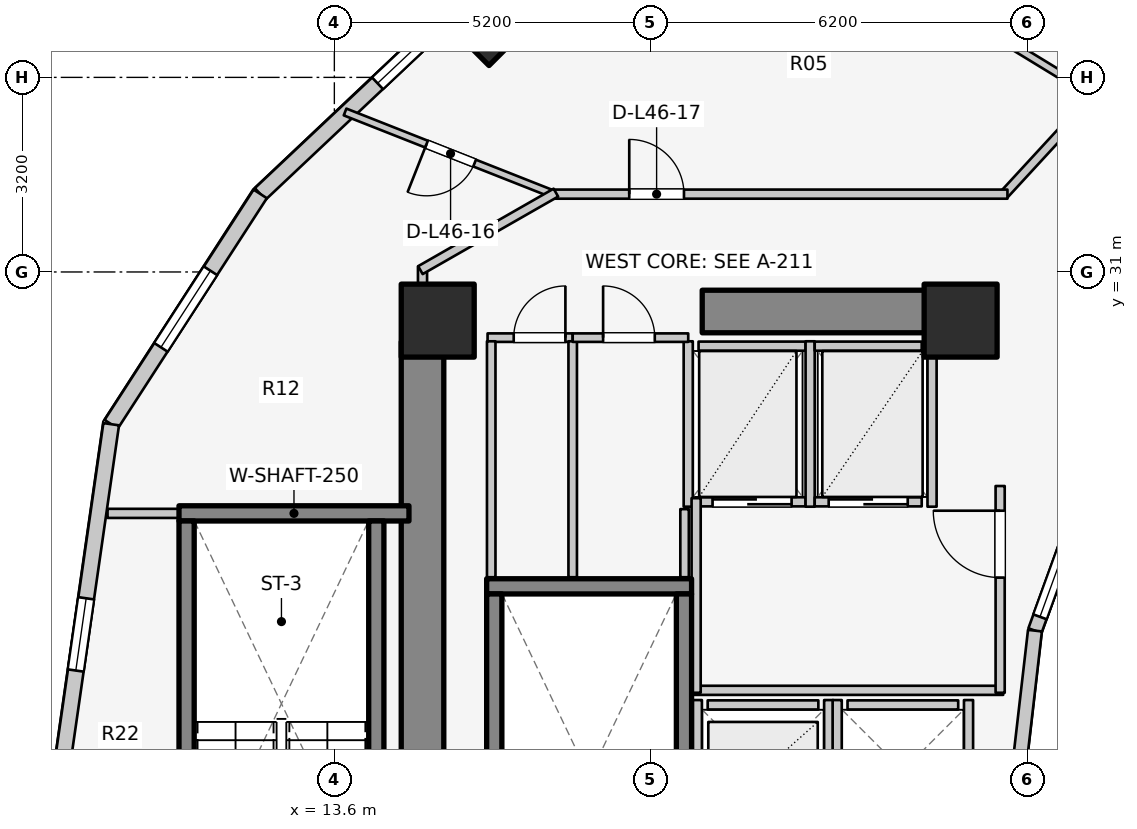
"""IFC4 building model, lengths in metres.
Left out: names, types, materials, properties, quantities, classifications, styles, units other than length and angle.
Written with IfcOpenShell. Run it as: python <this file> out.ifc"""

import sys

from ifc_helpers import new_model, si_unit, direction, frame, frame_2d, origin, origin_2d, place, context, subcontext, project, spatial, rectangle, extrude, element, fill, save


model = new_model("IFC4")
c1 = context("Model", 3, precision=1e-05, world=origin(), true_north=direction((0.0, 1.0)))
c2 = subcontext(c1, "Body", "Model", "MODEL_VIEW")
j1 = project(units=[si_unit("LENGTHUNIT", "METRE"), si_unit("PLANEANGLEUNIT", "RADIAN")], contexts=[c1])
p1 = place(None, origin())
s1 = spatial("IfcSite", under=j1, at=p1, CompositionType="ELEMENT")
p2 = place(p1, origin())
s2 = spatial("IfcBuilding", under=s1, at=p2, CompositionType="ELEMENT")
p3 = place(p2, frame((0.0, 0.0, 152.9)))
s3 = spatial("IfcBuildingStorey", under=s2, at=p3, CompositionType="ELEMENT", Elevation=152.9)
p4 = place(p3, frame((15.05, 17.05, 0.0), z_axis=(0.0, 0.0, 1.0), x_axis=(0.0, 1.0, 0.0)))
e1 = element("IfcWall", 1, at=p4, inside=s3, PredefinedType="SHEAR", context=c2, shape_type="SweptSolid", body=[
    extrude(rectangle(XDim=12.8, YDim=0.7, at=frame_2d((6.4, 0.0))), origin(), (0.0, 0.0, 1.0), 3.1),
])
p5 = place(p3, frame((19.65, 30.35, 0.0), z_axis=(0.0, 0.0, 1.0), x_axis=(1.0, 0.0, 0.0)))
e2 = element("IfcWall", 2, at=p5, inside=s3, PredefinedType="SHEAR", context=c2, shape_type="SweptSolid", body=[
    extrude(rectangle(XDim=4.5, YDim=0.7, at=frame_2d((2.25, 0.0))), origin(), (0.0, 0.0, 1.0), 3.1),
])
p6 = place(p3, frame((16.105, 25.83, 0.0), z_axis=(0.0, 0.0, 1.0), x_axis=(1.0, 0.0, 0.0)))
e3 = element("IfcWall", 3, at=p6, inside=s3, PredefinedType="SOLIDWALL", context=c2, shape_type="SweptSolid", body=[
    extrude(rectangle(XDim=3.37, YDim=0.25, at=frame_2d((1.685, 0.0))), origin(), (0.0, 0.0, 1.0), 3.1),
])
for number, where, z_axis, x_axis in (
    (4, (16.23, 17.895, 0.0), (0.0, 0.0, 1.0), (0.0, 1.0, 0.0)),
    (5, (19.35, 17.895, 0.0), (0.0, 0.0, 1.0), (0.0, 1.0, 0.0)),
):
    element("IfcWall", number, at=place(p3, frame(where, z_axis=z_axis, x_axis=x_axis)), inside=s3, PredefinedType="SOLIDWALL", context=c2, shape_type="SweptSolid", body=[
        extrude(rectangle(XDim=7.81, YDim=0.25, at=frame_2d((3.905, 0.0))), origin(), (0.0, 0.0, 1.0), 3.1),
    ])
p7 = place(p3, frame((11.045, 27.03, 0.0), z_axis=(0.0, 0.0, 1.0), x_axis=(1.0, 0.0, 0.0)))
e6 = element("IfcWall", 6, at=p7, inside=s3, PredefinedType="SOLIDWALL", context=c2, shape_type="SweptSolid", body=[
    extrude(rectangle(XDim=3.782, YDim=0.25, at=frame_2d((1.891, 0.0))), origin(), (0.0, 0.0, 1.0), 3.1),
])
for number, where, z_axis, x_axis in (
    (7, (11.17, 19.095, 0.0), (0.0, 0.0, 1.0), (0.0, 1.0, 0.0)),
    (8, (14.29, 19.095, 0.0), (0.0, 0.0, 1.0), (0.0, 1.0, 0.0)),
):
    element("IfcWall", number, at=place(p3, frame(where, z_axis=z_axis, x_axis=x_axis)), inside=s3, PredefinedType="SOLIDWALL", context=c2, shape_type="SweptSolid", body=[
        extrude(rectangle(XDim=7.81, YDim=0.25, at=frame_2d((3.905, 0.0))), origin(), (0.0, 0.0, 1.0), 3.1),
    ])
for number, where, z_axis, x_axis in (
    (9, (23.9, 30.2, 0.0), (0.0, 0.0, 1.0), (1.0, 0.0, 0.0)),
    (10, (15.3, 30.2, 0.0), (0.0, 0.0, 1.0), (1.0, 0.0, 0.0)),
):
    element("IfcColumn", number, at=place(p3, frame(where, z_axis=z_axis, x_axis=x_axis)), inside=s3, PredefinedType="COLUMN", context=c2, shape_type="SweptSolid", body=[
        extrude(rectangle(XDim=1.2, YDim=1.2, at=origin_2d()), origin(), (0.0, 0.0, 1.0), 3.1),
    ])
p8 = place(p3, frame((16.143, 35.031, 0.0), z_axis=(0.0, 0.0, 1.0), x_axis=(-0.707106781187, 0.707106781187, 0.0)))
e11 = element("IfcColumn", 11, at=p8, inside=s3, PredefinedType="COLUMN", context=c2, shape_type="SweptSolid", body=[
    extrude(rectangle(XDim=0.9, YDim=0.9, at=origin_2d()), origin(), (0.0, 0.0, 1.0), 3.1),
])
p9 = place(p3, frame((25.834, 27.06, 0.0), z_axis=(0.0, 0.0, 1.0), x_axis=(-0.341423187295, -0.93990968033, 0.0)))
e12 = element("IfcWall", 12, at=p9, inside=s3, PredefinedType="STANDARD", context=c2, shape_type="SweptSolid", body=[
    extrude(rectangle(XDim=2.084, YDim=0.23, at=frame_2d((1.042, 0.0))), origin(), (0.0, 0.0, 1.0), 2.84),
])
p10 = place(p9, frame((0.242, 0.0, 0.85)))
e13 = element("IfcOpeningElement", 13, at=p10, cuts=e12, PredefinedType="OPENING", context=c2, shape_type="SweptSolid", body=[
    extrude(rectangle(XDim=1.6, YDim=1.65, at=frame_2d((0.8, 0.825))), frame((0.0, 0.125, 0.0), z_axis=(0.0, -1.0, 0.0), x_axis=(1.0, 0.0, 0.0)), (0.0, 0.0, 1.0), 0.25),
])
p11 = place(p3, frame((25.123, 25.102, 0.0), z_axis=(0.0, 0.0, 1.0), x_axis=(-0.114711713601, -0.993398823617, 0.0)))
e14 = element("IfcWall", 14, at=p11, inside=s3, PredefinedType="STANDARD", context=c2, shape_type="SweptSolid", body=[
    extrude(rectangle(XDim=2.115, YDim=0.23, at=frame_2d((1.058, 0.0))), origin(), (0.0, 0.0, 1.0), 2.84),
])
p12 = place(p3, frame((15.731, 35.441, 0.0), z_axis=(0.0, 0.0, 1.0), x_axis=(-0.727667301037, -0.68593024354, 0.0)))
e15 = element("IfcWall", 15, at=p12, inside=s3, PredefinedType="STANDARD", context=c2, shape_type="SweptSolid", body=[
    extrude(rectangle(XDim=4.604, YDim=0.26, at=frame_2d((2.302, 0.0))), origin(), (0.0, 0.0, 1.0), 2.85),
])
p13 = place(p12, frame((0.751, 0.0, 0.75)))
e16 = element("IfcOpeningElement", 16, at=p13, cuts=e15, PredefinedType="OPENING", context=c2, shape_type="SweptSolid", body=[
    extrude(rectangle(XDim=1.2, YDim=1.5, at=frame_2d((0.6, 0.75))), frame((0.0, 0.14, 0.0), z_axis=(0.0, -1.0, 0.0), x_axis=(1.0, 0.0, 0.0)), (0.0, 0.0, 1.0), 0.28),
])
p14 = place(p3, frame((12.381, 32.284, 0.0), z_axis=(0.0, 0.0, 1.0), x_axis=(-0.543358984534, -0.839500454989, 0.0)))
e17 = element("IfcWall", 17, at=p14, inside=s3, PredefinedType="STANDARD", context=c2, shape_type="SweptSolid", body=[
    extrude(rectangle(XDim=4.511, YDim=0.26, at=frame_2d((2.256, 0.0))), origin(), (0.0, 0.0, 1.0), 2.85),
])
p15 = place(p14, frame((1.506, 0.0, 0.75)))
e18 = element("IfcOpeningElement", 18, at=p15, cuts=e17, PredefinedType="OPENING", context=c2, shape_type="SweptSolid", body=[
    extrude(rectangle(XDim=1.5, YDim=1.6, at=frame_2d((0.75, 0.8))), frame((0.0, 0.14, 0.0), z_axis=(0.0, -1.0, 0.0), x_axis=(1.0, 0.0, 0.0)), (0.0, 0.0, 1.0), 0.28),
])
p16 = place(p3, frame((9.93, 28.497, 0.0), z_axis=(0.0, 0.0, 1.0), x_axis=(-0.142227632286, -0.989833976288, 0.0)))
e19 = element("IfcWall", 19, at=p16, inside=s3, PredefinedType="STANDARD", context=c2, shape_type="SweptSolid", body=[
    extrude(rectangle(XDim=5.553, YDim=0.26, at=frame_2d((2.776, 0.0))), origin(), (0.0, 0.0, 1.0), 2.85),
])
p17 = place(p16, frame((2.892, 0.0, 0.75)))
e20 = element("IfcOpeningElement", 20, at=p17, cuts=e19, PredefinedType="OPENING", context=c2, shape_type="SweptSolid", body=[
    extrude(rectangle(XDim=1.2, YDim=1.5, at=frame_2d((0.6, 0.75))), frame((0.0, 0.14, 0.0), z_axis=(0.0, -1.0, 0.0), x_axis=(1.0, 0.0, 0.0)), (0.0, 0.0, 1.0), 0.28),
])
p18 = place(p3, frame((19.74, 23.88, 0.0), z_axis=(0.0, 0.0, 1.0), x_axis=(1.0, 0.0, 0.0)))
e21 = element("IfcWall", 21, at=p18, inside=s3, PredefinedType="SOLIDWALL", context=c2, shape_type="SweptSolid", body=[
    extrude(rectangle(XDim=1.82, YDim=0.15, at=frame_2d((0.91, 0.0))), origin(), (0.0, 0.0, 1.0), 2.855),
])
for number, where, z_axis, x_axis in (
    (22, (19.57, 21.64, 0.0), (0.0, 0.0, 1.0), (0.0, 1.0, 0.0)),
    (23, (21.73, 21.64, 0.0), (0.0, 0.0, 1.0), (0.0, 1.0, 0.0)),
):
    element("IfcWall", number, at=place(p3, frame(where, z_axis=z_axis, x_axis=x_axis)), inside=s3, PredefinedType="SOLIDWALL", context=c2, shape_type="SweptSolid", body=[
        extrude(rectangle(XDim=2.32, YDim=0.15, at=frame_2d((1.16, 0.0))), origin(), (0.0, 0.0, 1.0), 2.855),
    ])
p19 = place(p3, frame((22.04, 23.88, 0.0), z_axis=(0.0, 0.0, 1.0), x_axis=(1.0, 0.0, 0.0)))
e24 = element("IfcWall", 24, at=p19, inside=s3, PredefinedType="SOLIDWALL", context=c2, shape_type="SweptSolid", body=[
    extrude(rectangle(XDim=1.82, YDim=0.15, at=frame_2d((0.91, 0.0))), origin(), (0.0, 0.0, 1.0), 2.12),
])
p20 = place(p3, frame((21.87, 21.64, 0.0), z_axis=(0.0, 0.0, 1.0), x_axis=(0.0, 1.0, 0.0)))
e25 = element("IfcWall", 25, at=p20, inside=s3, PredefinedType="SOLIDWALL", context=c2, shape_type="SweptSolid", body=[
    extrude(rectangle(XDim=2.32, YDim=0.15, at=frame_2d((1.16, 0.0))), origin(), (0.0, 0.0, 1.0), 2.855),
])
p21 = place(p3, frame((24.03, 21.64, 0.0), z_axis=(0.0, 0.0, 1.0), x_axis=(0.0, 1.0, 0.0)))
e26 = element("IfcWall", 26, at=p21, inside=s3, PredefinedType="SOLIDWALL", context=c2, shape_type="SweptSolid", body=[
    extrude(rectangle(XDim=2.32, YDim=0.15, at=frame_2d((1.16, 0.0))), origin(), (0.0, 0.0, 1.0), 2.12),
])
p22 = place(p3, frame((19.59, 27.22, 0.0), z_axis=(0.0, 0.0, 1.0), x_axis=(1.0, 0.0, 0.0)))
e27 = element("IfcWall", 27, at=p22, inside=s3, PredefinedType="SOLIDWALL", context=c2, shape_type="SweptSolid", body=[
    extrude(rectangle(XDim=1.76, YDim=0.15, at=frame_2d((0.88, 0.0))), origin(), (0.0, 0.0, 1.0), 2.855),
])
p23 = place(p22, frame((0.23, 0.0, 0.0)))
e28 = element("IfcOpeningElement", 28, at=p23, cuts=e27, PredefinedType="OPENING", context=c2, shape_type="SweptSolid", body=[
    extrude(rectangle(XDim=1.3, YDim=2.1, at=frame_2d((0.65, 1.05))), frame((0.0, 0.085, 0.0), z_axis=(0.0, -1.0, 0.0), x_axis=(1.0, 0.0, 0.0)), (0.0, 0.0, 1.0), 0.17),
])
p24 = place(p3, frame((19.59, 29.78, 0.0), z_axis=(0.0, 0.0, 1.0), x_axis=(1.0, 0.0, 0.0)))
e29 = element("IfcWall", 29, at=p24, inside=s3, PredefinedType="SOLIDWALL", context=c2, shape_type="SweptSolid", body=[
    extrude(rectangle(XDim=1.76, YDim=0.15, at=frame_2d((0.88, 0.0))), origin(), (0.0, 0.0, 1.0), 2.855),
])
for number, where, z_axis, x_axis in (
    (30, (19.42, 27.14, 0.0), (0.0, 0.0, 1.0), (0.0, 1.0, 0.0)),
    (31, (21.425, 27.14, 0.0), (0.0, 0.0, 1.0), (0.0, 1.0, 0.0)),
):
    element("IfcWall", number, at=place(p3, frame(where, z_axis=z_axis, x_axis=x_axis)), inside=s3, PredefinedType="SOLIDWALL", context=c2, shape_type="SweptSolid", body=[
        extrude(rectangle(XDim=2.72, YDim=0.15, at=frame_2d((1.36, 0.0))), origin(), (0.0, 0.0, 1.0), 2.855),
    ])
p25 = place(p3, frame((21.5, 27.22, 0.0), z_axis=(0.0, 0.0, 1.0), x_axis=(1.0, 0.0, 0.0)))
e32 = element("IfcWall", 32, at=p25, inside=s3, PredefinedType="SOLIDWALL", context=c2, shape_type="SweptSolid", body=[
    extrude(rectangle(XDim=1.76, YDim=0.15, at=frame_2d((0.88, 0.0))), origin(), (0.0, 0.0, 1.0), 2.855),
])
p26 = place(p25, frame((0.23, 0.0, 0.0)))
e33 = element("IfcOpeningElement", 33, at=p26, cuts=e32, PredefinedType="OPENING", context=c2, shape_type="SweptSolid", body=[
    extrude(rectangle(XDim=1.3, YDim=2.1, at=frame_2d((0.65, 1.05))), frame((0.0, 0.085, 0.0), z_axis=(0.0, -1.0, 0.0), x_axis=(1.0, 0.0, 0.0)), (0.0, 0.0, 1.0), 0.17),
])
p27 = place(p3, frame((21.5, 29.78, 0.0), z_axis=(0.0, 0.0, 1.0), x_axis=(1.0, 0.0, 0.0)))
e34 = element("IfcWall", 34, at=p27, inside=s3, PredefinedType="SOLIDWALL", context=c2, shape_type="SweptSolid", body=[
    extrude(rectangle(XDim=1.76, YDim=0.15, at=frame_2d((0.88, 0.0))), origin(), (0.0, 0.0, 1.0), 2.855),
])
p28 = place(p3, frame((23.43, 27.14, 0.0), z_axis=(0.0, 0.0, 1.0), x_axis=(0.0, 1.0, 0.0)))
e35 = element("IfcWall", 35, at=p28, inside=s3, PredefinedType="SOLIDWALL", context=c2, shape_type="SweptSolid", body=[
    extrude(rectangle(XDim=2.72, YDim=0.15, at=frame_2d((1.36, 0.0))), origin(), (0.0, 0.0, 1.0), 2.855),
])
p29 = place(p3, frame((19.52, 24.12, 0.0), z_axis=(0.0, 0.0, 1.0), x_axis=(1.0, 0.0, 0.0)))
e36 = element("IfcWall", 36, at=p29, inside=s3, PredefinedType="PARTITIONING", context=c2, shape_type="SweptSolid", body=[
    extrude(rectangle(XDim=5.08, YDim=0.15, at=frame_2d((2.54, 0.0))), origin(), (0.0, 0.0, 1.0), 2.12),
])
p30 = place(p3, frame((19.55, 24.08, 0.0), z_axis=(0.0, 0.0, 1.0), x_axis=(0.0, 1.0, 0.0)))
e37 = element("IfcWall", 37, at=p30, inside=s3, PredefinedType="PARTITIONING", context=c2, shape_type="SweptSolid", body=[
    extrude(rectangle(XDim=3.2, YDim=0.15, at=frame_2d((1.6, 0.0))), origin(), (0.0, 0.0, 1.0), 2.855),
])
p31 = place(p3, frame((24.55, 24.08, 0.0), z_axis=(0.0, 0.0, 1.0), x_axis=(0.0, 1.0, 0.0)))
e38 = element("IfcWall", 38, at=p31, inside=s3, PredefinedType="PARTITIONING", context=c2, shape_type="SweptSolid", body=[
    extrude(rectangle(XDim=3.4, YDim=0.15, at=frame_2d((1.7, 0.0))), origin(), (0.0, 0.0, 1.0), 2.855),
])
p32 = place(p31, frame((1.894, 0.0, 0.0)))
e39 = element("IfcOpeningElement", 39, at=p32, cuts=e38, PredefinedType="OPENING", context=c2, shape_type="SweptSolid", body=[
    extrude(rectangle(XDim=1.1, YDim=2.1, at=frame_2d((0.55, 1.05))), frame((0.0, 0.085, 0.0), z_axis=(0.0, -1.0, 0.0), x_axis=(1.0, 0.0, 0.0)), (0.0, 0.0, 1.0), 0.17),
])
p33 = place(p3, frame((16.12, 29.92, 0.0), z_axis=(0.0, 0.0, 1.0), x_axis=(1.0, 0.0, 0.0)))
e40 = element("IfcWall", 40, at=p33, inside=s3, PredefinedType="PLUMBINGWALL", context=c2, shape_type="SweptSolid", body=[
    extrude(rectangle(XDim=1.4, YDim=0.14, at=frame_2d((0.7, 0.0))), origin(), (0.0, 0.0, 1.0), 2.855),
])
p34 = place(p33, frame((0.43, 0.0, 0.0)))
e41 = element("IfcOpeningElement", 41, at=p34, cuts=e40, PredefinedType="OPENING", context=c2, shape_type="SweptSolid", body=[
    extrude(rectangle(XDim=0.85, YDim=2.05, at=frame_2d((0.425, 1.025))), frame((0.0, 0.08, 0.0), z_axis=(0.0, -1.0, 0.0), x_axis=(1.0, 0.0, 0.0)), (0.0, 0.0, 1.0), 0.16),
])
for number, where, z_axis, x_axis in (
    (42, (16.18, 25.98, 0.0), (0.0, 0.0, 1.0), (0.0, 1.0, 0.0)),
    (43, (17.52, 25.98, 0.0), (0.0, 0.0, 1.0), (0.0, 1.0, 0.0)),
):
    element("IfcWall", number, at=place(p3, frame(where, z_axis=z_axis, x_axis=x_axis)), inside=s3, PredefinedType="PLUMBINGWALL", context=c2, shape_type="SweptSolid", body=[
        extrude(rectangle(XDim=3.88, YDim=0.14, at=frame_2d((1.94, 0.0))), origin(), (0.0, 0.0, 1.0), 2.855),
    ])
p35 = place(p3, frame((17.52, 29.92, 0.0), z_axis=(0.0, 0.0, 1.0), x_axis=(1.0, 0.0, 0.0)))
e44 = element("IfcWall", 44, at=p35, inside=s3, PredefinedType="PLUMBINGWALL", context=c2, shape_type="SweptSolid", body=[
    extrude(rectangle(XDim=1.9, YDim=0.14, at=frame_2d((0.95, 0.0))), origin(), (0.0, 0.0, 1.0), 2.855),
])
p36 = place(p35, frame((0.5, 0.0, 0.0)))
e45 = element("IfcOpeningElement", 45, at=p36, cuts=e44, PredefinedType="OPENING", context=c2, shape_type="SweptSolid", body=[
    extrude(rectangle(XDim=0.85, YDim=2.05, at=frame_2d((0.425, 1.025))), frame((0.0, 0.08, 0.0), z_axis=(0.0, -1.0, 0.0), x_axis=(1.0, 0.0, 0.0)), (0.0, 0.0, 1.0), 0.16),
])
p37 = place(p3, frame((19.36, 25.98, 0.0), z_axis=(0.0, 0.0, 1.0), x_axis=(0.0, 1.0, 0.0)))
e46 = element("IfcWall", 46, at=p37, inside=s3, PredefinedType="PLUMBINGWALL", context=c2, shape_type="SweptSolid", body=[
    extrude(rectangle(XDim=1.12, YDim=0.14, at=frame_2d((0.56, 0.0))), origin(), (0.0, 0.0, 1.0), 2.855),
])
p38 = place(p3, frame((9.87, 27.03, 0.0), z_axis=(0.0, 0.0, 1.0), x_axis=(1.0, 0.0, 0.0)))
e47 = element("IfcWall", 47, at=p38, inside=s3, PredefinedType="PARTITIONING", context=c2, shape_type="SweptSolid", body=[
    extrude(rectangle(XDim=1.17, YDim=0.15, at=frame_2d((0.585, 0.0))), origin(), (0.0, 0.0, 1.0), 2.855),
])
p39 = place(p3, frame((15.05, 29.8, 0.0), z_axis=(0.0, 0.0, 1.0), x_axis=(0.0, 1.0, 0.0)))
e48 = element("IfcWall", 48, at=p39, inside=s3, PredefinedType="PARTITIONING", context=c2, shape_type="SweptSolid", body=[
    extrude(rectangle(XDim=1.29, YDim=0.15, at=frame_2d((0.645, 0.0))), origin(), (0.0, 0.0, 1.0), 2.855),
])
p40 = place(p3, frame((17.247, 32.262, 0.0), z_axis=(0.0, 0.0, 1.0), x_axis=(-0.930204027108, 0.367042869367, 0.0)))
e49 = element("IfcWall", 49, at=p40, inside=s3, PredefinedType="MOVABLE", context=c2, shape_type="SweptSolid", body=[
    extrude(rectangle(XDim=3.731, YDim=0.12, at=frame_2d((1.865, 0.0))), origin(), (0.0, 0.0, 1.0), 2.22),
])
p41 = place(p40, frame((1.44, 0.0, 0.0)))
e50 = element("IfcOpeningElement", 50, at=p41, cuts=e49, PredefinedType="OPENING", context=c2, shape_type="SweptSolid", body=[
    extrude(rectangle(XDim=0.85, YDim=2.05, at=frame_2d((0.425, 1.025))), frame((0.0, 0.07, 0.0), z_axis=(0.0, -1.0, 0.0), x_axis=(1.0, 0.0, 0.0)), (0.0, 0.0, 1.0), 0.14),
])
p42 = place(p3, frame((26.072, 33.856, 0.0), z_axis=(0.0, 0.0, 1.0), x_axis=(-0.677579737957, -0.735449317567, 0.0)))
e51 = element("IfcWall", 51, at=p42, inside=s3, PredefinedType="PARTITIONING", context=c2, shape_type="SweptSolid", body=[
    extrude(rectangle(XDim=2.173, YDim=0.15, at=frame_2d((1.086, 0.0))), origin(), (0.0, 0.0, 1.0), 2.299),
])
p43 = place(p3, frame((17.15, 32.28, 0.0), z_axis=(0.0, 0.0, 1.0), x_axis=(1.0, 0.0, 0.0)))
e52 = element("IfcWall", 52, at=p43, inside=s3, PredefinedType="PARTITIONING", context=c2, shape_type="SweptSolid", body=[
    extrude(rectangle(XDim=7.52, YDim=0.15, at=frame_2d((3.76, 0.0))), origin(), (0.0, 0.0, 1.0), 2.299),
])
p44 = place(p43, frame((1.3, 0.0, 0.0)))
e53 = element("IfcOpeningElement", 53, at=p44, cuts=e52, PredefinedType="OPENING", context=c2, shape_type="SweptSolid", body=[
    extrude(rectangle(XDim=0.9, YDim=2.1, at=frame_2d((0.45, 1.05))), frame((0.0, 0.085, 0.0), z_axis=(0.0, -1.0, 0.0), x_axis=(1.0, 0.0, 0.0)), (0.0, 0.0, 1.0), 0.17),
])
p45 = place(p3, frame((17.243, 32.305, 0.0), z_axis=(0.0, 0.0, 1.0), x_axis=(-0.867991349648, -0.496579315857, 0.0)))
e54 = element("IfcWall", 54, at=p45, inside=s3, PredefinedType="PARTITIONING", context=c2, shape_type="SweptSolid", body=[
    extrude(rectangle(XDim=2.567, YDim=0.15, at=frame_2d((1.283, 0.0))), origin(), (0.0, 0.0, 1.0), 2.22),
])
p46 = place(p3, frame((26.062, 33.925, 0.0), z_axis=(0.0, 0.0, 1.0), x_axis=(-0.853440334679, 0.521190555501, 0.0)))
e55 = element("IfcWall", 55, at=p46, inside=s3, PredefinedType="PARTITIONING", context=c2, shape_type="SweptSolid", body=[
    extrude(rectangle(XDim=6.966, YDim=0.125, at=frame_2d((3.483, 0.0))), origin(), (0.0, 0.0, 1.0), 2.299),
])
p47 = place(p10, origin())
e56 = element("IfcWindow", 56, at=p47, inside=s3, PartitioningType="SINGLE_PANEL", PredefinedType="WINDOW", context=c2, shape_type="SweptSolid", body=[
    extrude(rectangle(XDim=1.6, YDim=1.65, at=frame_2d((0.8, 0.825))), frame((0.0, 0.03, 0.0), z_axis=(0.0, -1.0, 0.0), x_axis=(1.0, 0.0, 0.0)), (0.0, 0.0, 1.0), 0.06),
])
fill(e13, e56)
p48 = place(p13, origin())
e57 = element("IfcWindow", 57, at=p48, inside=s3, PartitioningType="SINGLE_PANEL", PredefinedType="WINDOW", context=c2, shape_type="SweptSolid", body=[
    extrude(rectangle(XDim=1.2, YDim=1.5, at=frame_2d((0.6, 0.75))), frame((0.0, 0.03, 0.0), z_axis=(0.0, -1.0, 0.0), x_axis=(1.0, 0.0, 0.0)), (0.0, 0.0, 1.0), 0.06),
])
fill(e16, e57)
p49 = place(p15, origin())
e58 = element("IfcWindow", 58, at=p49, inside=s3, PartitioningType="SINGLE_PANEL", PredefinedType="WINDOW", context=c2, shape_type="SweptSolid", body=[
    extrude(rectangle(XDim=1.5, YDim=1.6, at=frame_2d((0.75, 0.8))), frame((0.0, 0.03, 0.0), z_axis=(0.0, -1.0, 0.0), x_axis=(1.0, 0.0, 0.0)), (0.0, 0.0, 1.0), 0.06),
])
fill(e18, e58)
p50 = place(p17, origin())
e59 = element("IfcWindow", 59, at=p50, inside=s3, PartitioningType="SINGLE_PANEL", PredefinedType="WINDOW", context=c2, shape_type="SweptSolid", body=[
    extrude(rectangle(XDim=1.2, YDim=1.5, at=frame_2d((0.6, 0.75))), frame((0.0, 0.03, 0.0), z_axis=(0.0, -1.0, 0.0), x_axis=(1.0, 0.0, 0.0)), (0.0, 0.0, 1.0), 0.06),
])
fill(e20, e59)
p51 = place(p23, origin())
e60 = element("IfcDoor", 60, at=p51, inside=s3, OperationType="DOUBLE_DOOR_SLIDING", PredefinedType="DOOR", context=c2, shape_type="SweptSolid", body=[
    extrude(rectangle(XDim=1.3, YDim=2.1, at=frame_2d((0.65, 1.05))), frame((0.0, 0.025, 0.0), z_axis=(0.0, -1.0, 0.0), x_axis=(1.0, 0.0, 0.0)), (0.0, 0.0, 1.0), 0.05),
])
fill(e28, e60)
p52 = place(p26, origin())
e61 = element("IfcDoor", 61, at=p52, inside=s3, OperationType="DOUBLE_DOOR_SLIDING", PredefinedType="DOOR", context=c2, shape_type="SweptSolid", body=[
    extrude(rectangle(XDim=1.3, YDim=2.1, at=frame_2d((0.65, 1.05))), frame((0.0, 0.025, 0.0), z_axis=(0.0, -1.0, 0.0), x_axis=(1.0, 0.0, 0.0)), (0.0, 0.0, 1.0), 0.05),
])
fill(e33, e61)
p53 = place(p32, origin())
e62 = element("IfcDoor", 62, at=p53, inside=s3, OperationType="SINGLE_SWING_RIGHT", PredefinedType="DOOR", context=c2, shape_type="SweptSolid", body=[
    extrude(rectangle(XDim=1.1, YDim=2.1, at=frame_2d((0.55, 1.05))), frame((0.0, 0.025, 0.0), z_axis=(0.0, -1.0, 0.0), x_axis=(1.0, 0.0, 0.0)), (0.0, 0.0, 1.0), 0.05),
])
fill(e39, e62)
p54 = place(p34, origin())
e63 = element("IfcDoor", 63, at=p54, inside=s3, OperationType="SINGLE_SWING_RIGHT", PredefinedType="DOOR", context=c2, shape_type="SweptSolid", body=[
    extrude(rectangle(XDim=0.85, YDim=2.05, at=frame_2d((0.425, 1.025))), frame((0.0, 0.025, 0.0), z_axis=(0.0, -1.0, 0.0), x_axis=(1.0, 0.0, 0.0)), (0.0, 0.0, 1.0), 0.05),
])
fill(e41, e63)
p55 = place(p36, origin())
e64 = element("IfcDoor", 64, at=p55, inside=s3, OperationType="SINGLE_SWING_LEFT", PredefinedType="DOOR", context=c2, shape_type="SweptSolid", body=[
    extrude(rectangle(XDim=0.85, YDim=2.05, at=frame_2d((0.425, 1.025))), frame((0.0, 0.025, 0.0), z_axis=(0.0, -1.0, 0.0), x_axis=(1.0, 0.0, 0.0)), (0.0, 0.0, 1.0), 0.05),
])
fill(e45, e64)
p56 = place(p41, origin())
e65 = element("IfcDoor", 65, at=p56, inside=s3, OperationType="SINGLE_SWING_RIGHT", PredefinedType="DOOR", context=c2, shape_type="SweptSolid", body=[
    extrude(rectangle(XDim=0.85, YDim=2.05, at=frame_2d((0.425, 1.025))), frame((0.0, 0.025, 0.0), z_axis=(0.0, -1.0, 0.0), x_axis=(1.0, 0.0, 0.0)), (0.0, 0.0, 1.0), 0.05),
])
fill(e50, e65)
p57 = place(p44, origin())
e66 = element("IfcDoor", 66, at=p57, inside=s3, OperationType="SINGLE_SWING_LEFT", PredefinedType="DOOR", context=c2, shape_type="SweptSolid", body=[
    extrude(rectangle(XDim=0.9, YDim=2.1, at=frame_2d((0.45, 1.05))), frame((0.0, 0.025, 0.0), z_axis=(0.0, -1.0, 0.0), x_axis=(1.0, 0.0, 0.0)), (0.0, 0.0, 1.0), 0.05),
])
fill(e53, e66)
save(model, sys.argv[1])
